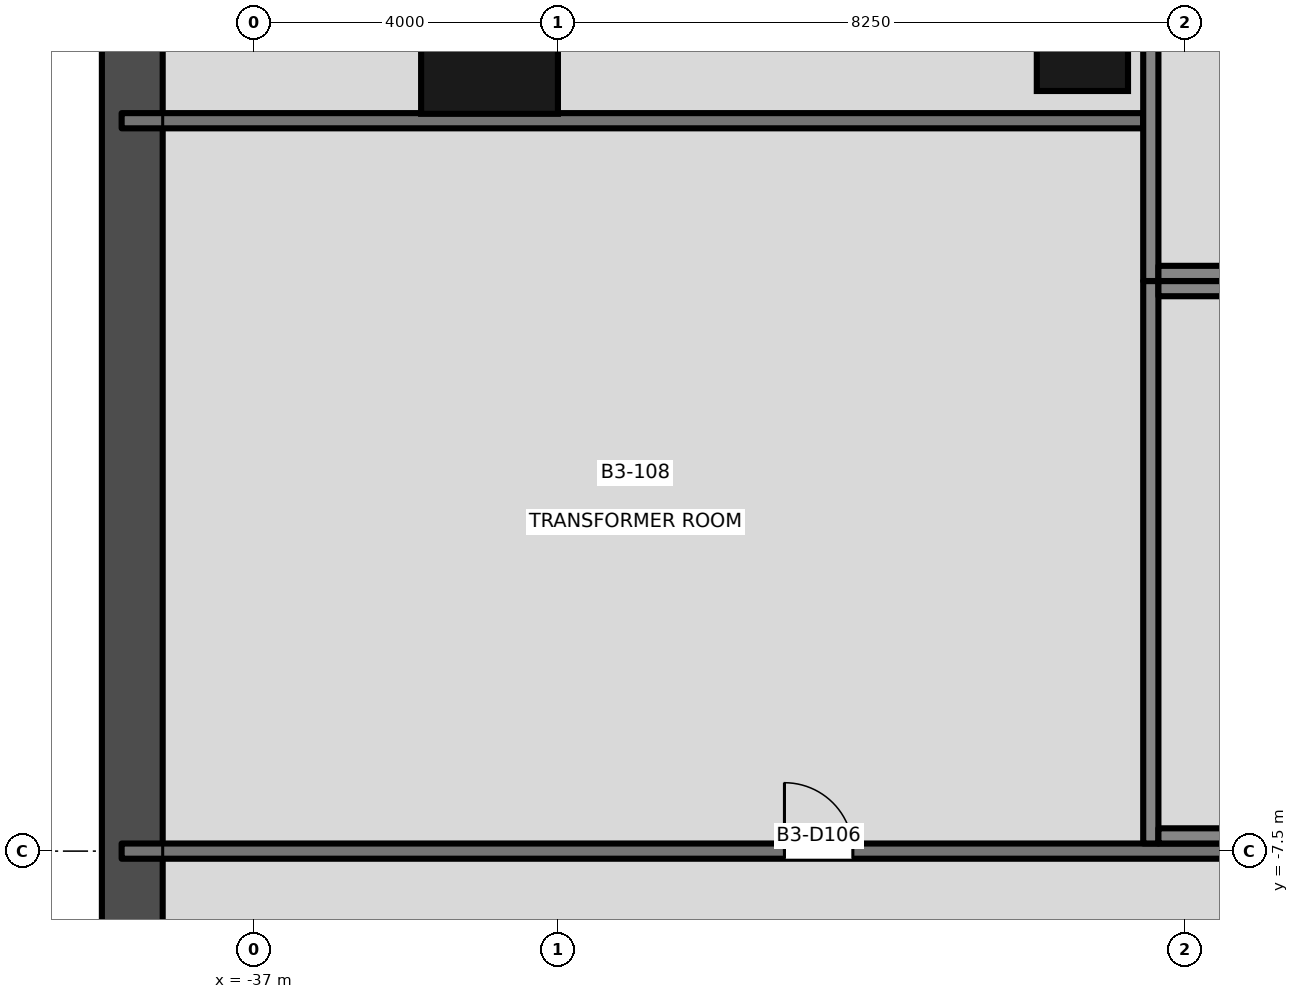
"""IFC4 building model, lengths in metres.
Left out: names, types, materials, properties, quantities, classifications, styles, units other than length and angle.
Written with IfcOpenShell. Run it as: python <this file> out.ifc"""

import sys

from ifc_helpers import new_model, si_unit, direction, frame, frame_2d, origin, origin_2d, place, context, subcontext, project, spatial, rectangle, extrude, element, fill, save


model = new_model("IFC4")
c1 = context("Model", 3, precision=1e-05, world=origin(), true_north=direction((0.0, 1.0)))
c2 = subcontext(c1, "Body", "Model", "MODEL_VIEW")
j1 = project(units=[si_unit("LENGTHUNIT", "METRE"), si_unit("PLANEANGLEUNIT", "RADIAN")], contexts=[c1])
p1 = place(None, origin())
s1 = spatial("IfcSite", under=j1, at=p1, CompositionType="ELEMENT")
p2 = place(p1, origin())
s2 = spatial("IfcBuilding", under=s1, at=p2, CompositionType="ELEMENT")
p3 = place(p2, frame((0.0, 0.0, -13.5)))
s3 = spatial("IfcBuildingStorey", under=s2, at=p3, CompositionType="ELEMENT", Elevation=-13.5)
p4 = place(p3, frame((-38.6, -38.7, -0.25), z_axis=(0.0, 0.0, 1.0), x_axis=(0.0, 1.0, 0.0)))
e1 = element("IfcWall", 1, at=p4, inside=s3, PredefinedType="SOLIDWALL", context=c2, shape_type="SweptSolid", body=[
    extrude(rectangle(XDim=51.9, YDim=0.8, at=frame_2d((25.95, 0.0))), origin(), (0.0, 0.0, 1.0), 4.05),
])
p5 = place(p3, frame((-33.9, 3.1, -0.25), z_axis=(0.0, 0.0, 1.0), x_axis=(0.0, 1.0, 0.0)))
e2 = element("IfcColumn", 2, at=p5, inside=s3, PredefinedType="COLUMN", context=c2, shape_type="SweptSolid", body=[
    extrude(rectangle(XDim=1.8, YDim=1.8, at=origin_2d()), origin(), (0.0, 0.0, 1.0), 4.05),
])
p6 = place(p3, frame((-26.1, 3.1, -0.25), z_axis=(0.0, 0.0, 1.0), x_axis=(1.0, 0.0, 0.0)))
e3 = element("IfcColumn", 3, at=p6, inside=s3, PredefinedType="COLUMN", context=c2, shape_type="SweptSolid", body=[
    extrude(rectangle(XDim=1.2, YDim=1.2, at=origin_2d()), origin(), (0.0, 0.0, 1.0), 4.05),
])
p7 = place(p3, frame((-25.2, -7.4, -0.25), z_axis=(0.0, 0.0, 1.0), x_axis=(0.0, 1.0, 0.0)))
e4 = element("IfcWall", 4, at=p7, inside=s3, PredefinedType="SHEAR", context=c2, shape_type="SweptSolid", body=[
    extrude(rectangle(XDim=7.4, YDim=0.2, at=frame_2d((3.7, 0.0))), origin(), (0.0, 0.0, 1.0), 4.05),
])
for number, where, z_axis, x_axis in (
    (5, (-25.1, -0.1, -0.25), (0.0, 0.0, 1.0), (1.0, 0.0, 0.0)),
    (6, (-25.1, -7.3, -0.25), (0.0, 0.0, 1.0), (1.0, 0.0, 0.0)),
):
    element("IfcWall", number, at=place(p3, frame(where, z_axis=z_axis, x_axis=x_axis)), inside=s3, PredefinedType="SHEAR", context=c2, shape_type="SweptSolid", body=[
        extrude(rectangle(XDim=4.5, YDim=0.2, at=frame_2d((2.25, 0.0))), origin(), (0.0, 0.0, 1.0), 4.05),
    ])
p8 = place(p3, frame((-25.2, 0.0, -0.25), z_axis=(0.0, 0.0, 1.0), x_axis=(0.0, 1.0, 0.0)))
e7 = element("IfcWall", 7, at=p8, inside=s3, PredefinedType="SHEAR", context=c2, shape_type="SweptSolid", body=[
    extrude(rectangle(XDim=7.4, YDim=0.2, at=frame_2d((3.7, 0.0))), origin(), (0.0, 0.0, 1.0), 4.05),
])
p9 = place(p3, frame((-25.1, 0.1, -0.25), z_axis=(0.0, 0.0, 1.0), x_axis=(1.0, 0.0, 0.0)))
e8 = element("IfcWall", 8, at=p9, inside=s3, PredefinedType="SHEAR", context=c2, shape_type="SweptSolid", body=[
    extrude(rectangle(XDim=4.5, YDim=0.2, at=frame_2d((2.25, 0.0))), origin(), (0.0, 0.0, 1.0), 4.05),
])
p10 = place(p3, frame((-38.74, -7.5, 0.0), z_axis=(0.0, 0.0, 1.0), x_axis=(1.0, 0.0, 0.0)))
e9 = element("IfcWall", 9, at=p10, inside=s3, PredefinedType="PARTITIONING", context=c2, shape_type="SweptSolid", body=[
    extrude(rectangle(XDim=18.34, YDim=0.2, at=frame_2d((9.17, 0.0))), origin(), (0.0, 0.0, 1.0), 2.6),
])
p11 = place(p10, frame((8.72, 0.0, 0.0)))
e10 = element("IfcOpeningElement", 10, at=p11, cuts=e9, PredefinedType="OPENING", context=c2, shape_type="SweptSolid", body=[
    extrude(rectangle(XDim=0.9, YDim=2.1, at=frame_2d((0.45, 1.05))), frame((0.0, 0.111, 0.0), z_axis=(0.0, -1.0, 0.0), x_axis=(1.0, 0.0, 0.0)), (0.0, 0.0, 1.0), 0.221),
])
p12 = place(p3, frame((-38.74, 2.109, 0.0), z_axis=(0.0, 0.0, 1.0), x_axis=(1.0, 0.0, 0.0)))
e11 = element("IfcWall", 11, at=p12, inside=s3, PredefinedType="PARTITIONING", context=c2, shape_type="SweptSolid", body=[
    extrude(rectangle(XDim=13.44, YDim=0.2, at=frame_2d((6.72, 0.0))), origin(), (0.0, 0.0, 1.0), 2.6),
])
p13 = place(p11, origin())
e12 = element("IfcDoor", 12, at=p13, inside=s3, OperationType="SINGLE_SWING_LEFT", PredefinedType="DOOR", context=c2, shape_type="SweptSolid", body=[
    extrude(rectangle(XDim=0.9, YDim=2.1, at=frame_2d((0.45, 1.05))), frame((0.0, 0.025, 0.0), z_axis=(0.0, -1.0, 0.0), x_axis=(1.0, 0.0, 0.0)), (0.0, 0.0, 1.0), 0.05),
])
fill(e10, e12)
save(model, sys.argv[1])
